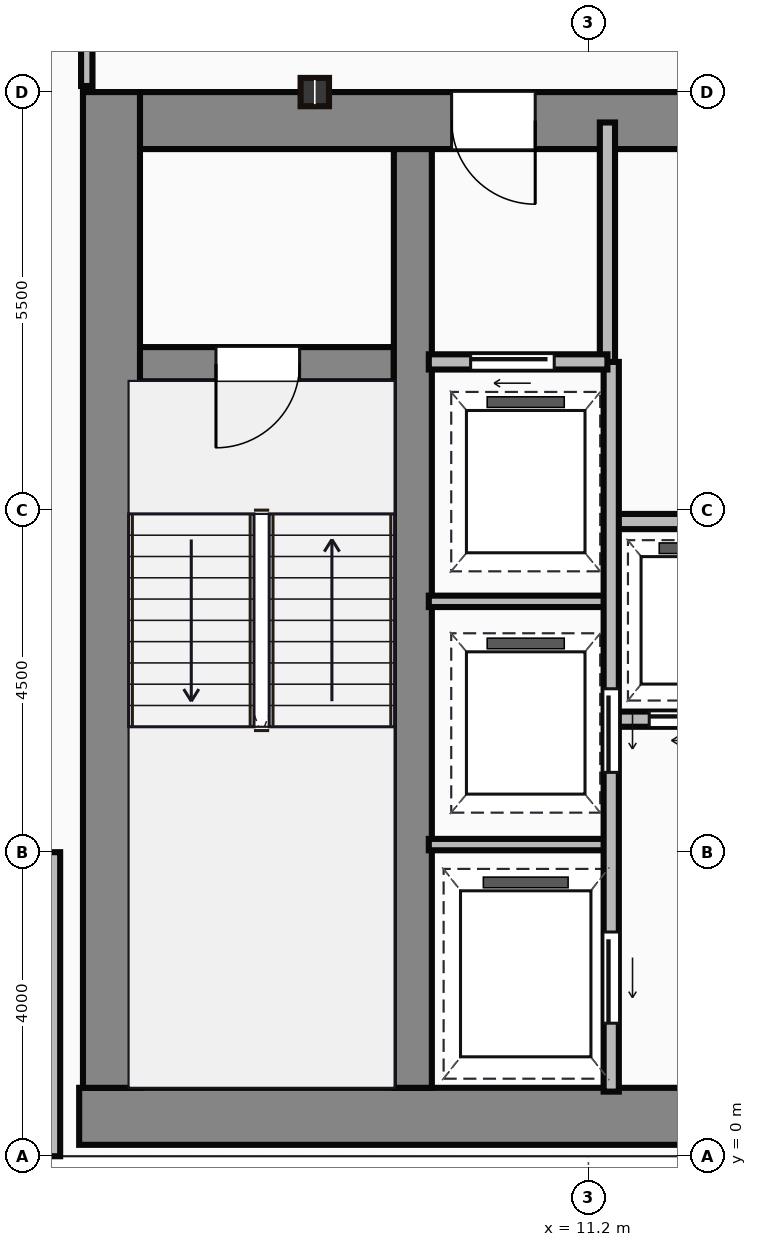
"""IFC4 building model, lengths in metres.
Left out: names, types, materials, properties, quantities, classifications, styles, units other than length and angle.
Written with IfcOpenShell. Run it as: python <this file> out.ifc"""

import sys

from ifc_helpers import new_model, si_unit, direction, frame, frame_2d, origin, origin_2d, place, context, subcontext, project, spatial, rectangle, i_section, extrude, source, transform, mapped, element, fill, save


model = new_model("IFC4")
c1 = context("Model", 3, precision=1e-05, world=origin(), true_north=direction((0.0, 1.0)))
c2 = subcontext(c1, "Body", "Model", "MODEL_VIEW")
j1 = project(units=[si_unit("LENGTHUNIT", "METRE"), si_unit("PLANEANGLEUNIT", "RADIAN")], contexts=[c1])
p1 = place(None, origin())
s1 = spatial("IfcSite", under=j1, at=p1, CompositionType="ELEMENT")
p2 = place(p1, origin())
s2 = spatial("IfcBuilding", under=s1, at=p2, CompositionType="ELEMENT")
p3 = place(p2, frame((0.0, 0.0, 151.55)))
s3 = spatial("IfcBuildingStorey", under=s2, at=p3, CompositionType="ELEMENT", Elevation=151.55)
m1 = source(origin(), c2, "Body", "SweptSolid", [
    extrude(rectangle(XDim=29.5, YDim=0.75, at=frame_2d((14.75, 0.0))), origin(), (0.0, 0.0, 1.0), 3.65),
])
p4 = place(p3, frame((4.5, 0.525, 0.0), z_axis=(0.0, 0.0, 1.0), x_axis=(1.0, 0.0, 0.0)))
e1 = element("IfcWall", 1, at=p4, inside=s3, PredefinedType="SHEAR", context=c2, shape_type="MappedRepresentation", body=[
    mapped(m1, transform((0.0, 0.0, 0.0))),
])
m2 = source(origin(), c2, "Body", "SweptSolid", [
    extrude(rectangle(XDim=13.1, YDim=0.75, at=frame_2d((6.55, 0.0))), origin(), (0.0, 0.0, 1.0), 3.65),
])
p5 = place(p3, frame((4.925, 0.9, 0.0), z_axis=(0.0, 0.0, 1.0), x_axis=(0.0, 1.0, 0.0)))
e2 = element("IfcWall", 2, at=p5, inside=s3, PredefinedType="SHEAR", context=c2, shape_type="MappedRepresentation", body=[
    mapped(m2, transform((0.0, 0.0, 0.0))),
])
m3 = source(origin(), c2, "Body", "SweptSolid", [
    extrude(rectangle(XDim=9.1, YDim=0.75, at=frame_2d((4.55, 0.0))), origin(), (0.0, 0.0, 1.0), 3.65),
])
p6 = place(p3, frame((5.3, 13.625, 0.0), z_axis=(0.0, 0.0, 1.0), x_axis=(1.0, 0.0, 0.0)))
e3 = element("IfcWall", 3, at=p6, inside=s3, PredefinedType="SHEAR", context=c2, shape_type="MappedRepresentation", body=[
    mapped(m3, transform((0.0, 0.0, 0.0))),
])
p7 = place(p6, frame((4.1, 0.0, 0.0)))
e4 = element("IfcOpeningElement", 4, at=p7, cuts=e3, PredefinedType="OPENING", context=c2, shape_type="SweptSolid", body=[
    extrude(rectangle(XDim=1.1, YDim=2.15, at=frame_2d((0.55, 1.075))), frame((0.0, 0.385, 0.0), z_axis=(0.0, -1.0, 0.0), x_axis=(1.0, 0.0, 0.0)), (0.0, 0.0, 1.0), 0.77),
])
m4 = source(origin(), c2, "Body", "SweptSolid", [
    extrude(rectangle(XDim=12.35, YDim=0.5, at=frame_2d((6.175, 0.0))), origin(), (0.0, 0.0, 1.0), 3.65),
])
p8 = place(p3, frame((8.89, 0.9, 0.0), z_axis=(0.0, 0.0, 1.0), x_axis=(0.0, 1.0, 0.0)))
e5 = element("IfcWall", 5, at=p8, inside=s3, PredefinedType="SHEAR", context=c2, shape_type="MappedRepresentation", body=[
    mapped(m4, transform((0.0, 0.0, 0.0))),
])
m5 = source(origin(), c2, "Body", "SweptSolid", [
    extrude(rectangle(XDim=3.39, YDim=0.45, at=frame_2d((1.695, 0.0))), origin(), (0.0, 0.0, 1.0), 3.65),
])
p9 = place(p3, frame((5.25, 10.42, 0.0), z_axis=(0.0, 0.0, 1.0), x_axis=(1.0, 0.0, 0.0)))
e6 = element("IfcWall", 6, at=p9, inside=s3, PredefinedType="SHEAR", context=c2, shape_type="MappedRepresentation", body=[
    mapped(m5, transform((0.0, 0.0, 0.0))),
])
p10 = place(p9, frame((1.05, 0.0, 0.0)))
e7 = element("IfcOpeningElement", 7, at=p10, cuts=e6, PredefinedType="OPENING", context=c2, shape_type="SweptSolid", body=[
    extrude(rectangle(XDim=1.1, YDim=2.15, at=frame_2d((0.55, 1.075))), frame((0.0, 0.235, 0.0), z_axis=(0.0, -1.0, 0.0), x_axis=(1.0, 0.0, 0.0)), (0.0, 0.0, 1.0), 0.47),
])
m6 = source(origin(), c2, "Body", "SweptSolid", [
    extrude(i_section(OverallWidth=0.374, OverallDepth=0.372, WebThickness=0.016, FlangeThickness=0.026, at=origin_2d()), origin(), (0.0, 0.0, 1.0), 3.65),
])
p11 = place(p3, frame((7.6, 14.0, 0.0), z_axis=(0.0, 0.0, 1.0), x_axis=(1.0, 0.0, 0.0)))
e8 = element("IfcColumn", 8, at=p11, inside=s3, PredefinedType="COLUMN", context=c2, shape_type="MappedRepresentation", body=[
    mapped(m6, transform((0.0, 0.0, 0.0))),
])
m7 = source(origin(), c2, "Body", "SweptSolid", [
    extrude(rectangle(XDim=4.0, YDim=0.25, at=frame_2d((2.0, 0.0))), origin(), (0.0, 0.0, 1.0), 3.4),
])
p12 = place(p3, frame((4.125, 4.0, 0.0), z_axis=(0.0, 0.0, 1.0), x_axis=(0.0, -1.0, 0.0)))
e9 = element("IfcWall", 9, at=p12, inside=s3, PredefinedType="STANDARD", context=c2, shape_type="MappedRepresentation", body=[
    mapped(m7, transform((0.0, 0.0, 0.0))),
])
m8 = source(origin(), c2, "Body", "SweptSolid", [
    extrude(rectangle(XDim=3.18, YDim=0.2, at=frame_2d((1.59, 0.0))), origin(), (0.0, 0.0, 1.0), 3.4),
])
p13 = place(p3, frame((11.45, 10.42, 0.0), z_axis=(0.0, 0.0, 1.0), x_axis=(0.0, 1.0, 0.0)))
e10 = element("IfcWall", 10, at=p13, inside=s3, PredefinedType="PARTITIONING", context=c2, shape_type="MappedRepresentation", body=[
    mapped(m8, transform((0.0, 0.0, 0.0))),
])
m9 = source(origin(), c2, "Body", "SweptSolid", [
    extrude(rectangle(XDim=2.35, YDim=0.2, at=frame_2d((1.175, 0.0))), origin(), (0.0, 0.0, 1.0), 3.4),
])
p14 = place(p3, frame((9.1, 10.45, 0.0), z_axis=(0.0, 0.0, 1.0), x_axis=(1.0, 0.0, 0.0)))
e11 = element("IfcWall", 11, at=p14, inside=s3, PredefinedType="PARTITIONING", context=c2, shape_type="MappedRepresentation", body=[
    mapped(m9, transform((0.0, 0.0, 0.0))),
])
p15 = place(p14, frame((0.55, 0.0, 0.0)))
e12 = element("IfcOpeningElement", 12, at=p15, cuts=e11, PredefinedType="OPENING", context=c2, shape_type="SweptSolid", body=[
    extrude(rectangle(XDim=1.1, YDim=2.15, at=frame_2d((0.55, 1.075))), frame((0.0, 0.11, 0.0), z_axis=(0.0, -1.0, 0.0), x_axis=(1.0, 0.0, 0.0)), (0.0, 0.0, 1.0), 0.22),
])
m10 = source(origin(), c2, "Body", "SweptSolid", [
    extrude(rectangle(XDim=9.6, YDim=0.2, at=frame_2d((4.8, 0.0))), origin(), (0.0, 0.0, 1.0), 3.4),
])
p16 = place(p3, frame((11.5, 0.85, 0.0), z_axis=(0.0, 0.0, 1.0), x_axis=(0.0, 1.0, 0.0)))
e13 = element("IfcWall", 13, at=p16, inside=s3, PredefinedType="PARTITIONING", context=c2, shape_type="MappedRepresentation", body=[
    mapped(m10, transform((0.0, 0.0, 0.0))),
])
p17 = place(p16, frame((4.2, 0.0, 0.0)))
e14 = element("IfcOpeningElement", 14, at=p17, cuts=e13, PredefinedType="OPENING", context=c2, shape_type="SweptSolid", body=[
    extrude(rectangle(XDim=1.1, YDim=2.15, at=frame_2d((0.55, 1.075))), frame((0.0, 0.11, 0.0), z_axis=(0.0, -1.0, 0.0), x_axis=(1.0, 0.0, 0.0)), (0.0, 0.0, 1.0), 0.22),
])
p18 = place(p16, frame((0.9, 0.0, 0.0)))
e15 = element("IfcOpeningElement", 15, at=p18, cuts=e13, PredefinedType="OPENING", context=c2, shape_type="SweptSolid", body=[
    extrude(rectangle(XDim=1.2, YDim=2.15, at=frame_2d((0.6, 1.075))), frame((0.0, 0.11, 0.0), z_axis=(0.0, -1.0, 0.0), x_axis=(1.0, 0.0, 0.0)), (0.0, 0.0, 1.0), 0.22),
])
m11 = source(origin(), c2, "Body", "SweptSolid", [
    extrude(rectangle(XDim=2.4, YDim=0.15, at=frame_2d((1.2, 0.0))), origin(), (0.0, 0.0, 1.0), 3.4),
])
for number, where, z_axis, x_axis in (
    (16, (9.1, 4.1, 0.0), (0.0, 0.0, 1.0), (1.0, 0.0, 0.0)),
    (17, (9.1, 7.3, 0.0), (0.0, 0.0, 1.0), (1.0, 0.0, 0.0)),
):
    element("IfcWall", number, at=place(p3, frame(where, z_axis=z_axis, x_axis=x_axis)), inside=s3, PredefinedType="PARTITIONING", context=c2, shape_type="MappedRepresentation", body=[
        mapped(m11, transform((0.0, 0.0, 0.0))),
    ])
m12 = source(origin(), c2, "Body", "SweptSolid", [
    extrude(rectangle(XDim=11.85, YDim=0.2, at=frame_2d((5.925, 0.0))), origin(), (0.0, 0.0, 1.0), 3.4),
])
p19 = place(p3, frame((11.55, 5.75, 0.0), z_axis=(0.0, 0.0, 1.0), x_axis=(1.0, 0.0, 0.0)))
e18 = element("IfcWall", 18, at=p19, inside=s3, PredefinedType="PARTITIONING", context=c2, shape_type="MappedRepresentation", body=[
    mapped(m12, transform((0.0, 0.0, 0.0))),
])
p20 = place(p19, frame((0.45, 0.0, 0.0)))
e19 = element("IfcOpeningElement", 19, at=p20, cuts=e18, PredefinedType="OPENING", context=c2, shape_type="SweptSolid", body=[
    extrude(rectangle(XDim=1.05, YDim=2.15, at=frame_2d((0.525, 1.075))), frame((0.0, 0.11, 0.0), z_axis=(0.0, -1.0, 0.0), x_axis=(1.0, 0.0, 0.0)), (0.0, 0.0, 1.0), 0.22),
])
p21 = place(p19, frame((2.4, 0.0, 0.0)))
e20 = element("IfcOpeningElement", 20, at=p21, cuts=e18, PredefinedType="OPENING", context=c2, shape_type="SweptSolid", body=[
    extrude(rectangle(XDim=1.05, YDim=2.15, at=frame_2d((0.525, 1.075))), frame((0.0, 0.11, 0.0), z_axis=(0.0, -1.0, 0.0), x_axis=(1.0, 0.0, 0.0)), (0.0, 0.0, 1.0), 0.22),
])
p22 = place(p19, frame((4.35, 0.0, 0.0)))
e21 = element("IfcOpeningElement", 21, at=p22, cuts=e18, PredefinedType="OPENING", context=c2, shape_type="SweptSolid", body=[
    extrude(rectangle(XDim=1.05, YDim=2.15, at=frame_2d((0.525, 1.075))), frame((0.0, 0.11, 0.0), z_axis=(0.0, -1.0, 0.0), x_axis=(1.0, 0.0, 0.0)), (0.0, 0.0, 1.0), 0.22),
])
p23 = place(p19, frame((6.3, 0.0, 0.0)))
e22 = element("IfcOpeningElement", 22, at=p23, cuts=e18, PredefinedType="OPENING", context=c2, shape_type="SweptSolid", body=[
    extrude(rectangle(XDim=1.05, YDim=2.15, at=frame_2d((0.525, 1.075))), frame((0.0, 0.11, 0.0), z_axis=(0.0, -1.0, 0.0), x_axis=(1.0, 0.0, 0.0)), (0.0, 0.0, 1.0), 0.22),
])
p24 = place(p19, frame((8.25, 0.0, 0.0)))
e23 = element("IfcOpeningElement", 23, at=p24, cuts=e18, PredefinedType="OPENING", context=c2, shape_type="SweptSolid", body=[
    extrude(rectangle(XDim=1.05, YDim=2.15, at=frame_2d((0.525, 1.075))), frame((0.0, 0.11, 0.0), z_axis=(0.0, -1.0, 0.0), x_axis=(1.0, 0.0, 0.0)), (0.0, 0.0, 1.0), 0.22),
])
p25 = place(p19, frame((10.2, 0.0, 0.0)))
e24 = element("IfcOpeningElement", 24, at=p25, cuts=e18, PredefinedType="OPENING", context=c2, shape_type="SweptSolid", body=[
    extrude(rectangle(XDim=1.05, YDim=2.15, at=frame_2d((0.525, 1.075))), frame((0.0, 0.11, 0.0), z_axis=(0.0, -1.0, 0.0), x_axis=(1.0, 0.0, 0.0)), (0.0, 0.0, 1.0), 0.22),
])
p26 = place(p3, frame((11.55, 8.35, 0.0), z_axis=(0.0, 0.0, 1.0), x_axis=(1.0, 0.0, 0.0)))
e25 = element("IfcWall", 25, at=p26, inside=s3, PredefinedType="PARTITIONING", context=c2, shape_type="MappedRepresentation", body=[
    mapped(m12, transform((0.0, 0.0, 0.0))),
])
m13 = source(origin(), c2, "Body", "SweptSolid", [
    extrude(rectangle(XDim=2.22, YDim=0.15, at=frame_2d((1.11, 0.0))), origin(), (0.0, 0.0, 1.0), 3.4),
])
p27 = place(p3, frame((4.6, 14.08, 0.0), z_axis=(0.0, 0.0, 1.0), x_axis=(0.0, 1.0, 0.0)))
e26 = element("IfcWall", 26, at=p27, inside=s3, PredefinedType="PARTITIONING", context=c2, shape_type="MappedRepresentation", body=[
    mapped(m13, transform((0.0, 0.0, 0.0))),
])
m14 = source(origin(), c2, "Body", "SweptSolid", [
    extrude(rectangle(XDim=1.1, YDim=2.15, at=frame_2d((0.55, 1.075))), frame((0.0, 0.025, 0.0), z_axis=(0.0, -1.0, 0.0), x_axis=(1.0, 0.0, 0.0)), (0.0, 0.0, 1.0), 0.05),
])
p28 = place(p10, frame((1.1, 0.0, 0.0), z_axis=(0.0, 0.0, 1.0), x_axis=(-1.0, 0.0, 0.0)))
e27 = element("IfcDoor", 27, at=p28, inside=s3, OperationType="SINGLE_SWING_LEFT", PredefinedType="DOOR", context=c2, shape_type="MappedRepresentation", body=[
    mapped(m14, transform((0.0, 0.0, 0.0))),
])
fill(e7, e27)
p29 = place(p7, origin())
e28 = element("IfcDoor", 28, at=p29, inside=s3, OperationType="SINGLE_SWING_RIGHT", PredefinedType="DOOR", context=c2, shape_type="MappedRepresentation", body=[
    mapped(m14, transform((0.0, 0.0, 0.0))),
])
fill(e4, e28)
p30 = place(p15, origin())
e29 = element("IfcDoor", 29, at=p30, inside=s3, OperationType="SLIDING_TO_LEFT", PredefinedType="DOOR", context=c2, shape_type="MappedRepresentation", body=[
    mapped(m14, transform((0.0, 0.0, 0.0))),
])
fill(e12, e29)
p31 = place(p17, frame((1.1, 0.0, 0.0), z_axis=(0.0, 0.0, 1.0), x_axis=(-1.0, 0.0, 0.0)))
e30 = element("IfcDoor", 30, at=p31, inside=s3, OperationType="SLIDING_TO_LEFT", PredefinedType="DOOR", context=c2, shape_type="MappedRepresentation", body=[
    mapped(m14, transform((0.0, 0.0, 0.0))),
])
fill(e14, e30)
m15 = source(origin(), c2, "Body", "SweptSolid", [
    extrude(rectangle(XDim=1.2, YDim=2.15, at=frame_2d((0.6, 1.075))), frame((0.0, 0.025, 0.0), z_axis=(0.0, -1.0, 0.0), x_axis=(1.0, 0.0, 0.0)), (0.0, 0.0, 1.0), 0.05),
])
p32 = place(p18, frame((1.2, 0.0, 0.0), z_axis=(0.0, 0.0, 1.0), x_axis=(-1.0, 0.0, 0.0)))
e31 = element("IfcDoor", 31, at=p32, inside=s3, OperationType="SLIDING_TO_LEFT", PredefinedType="DOOR", context=c2, shape_type="MappedRepresentation", body=[
    mapped(m15, transform((0.0, 0.0, 0.0))),
])
fill(e15, e31)
m16 = source(origin(), c2, "Body", "SweptSolid", [
    extrude(rectangle(XDim=1.05, YDim=2.15, at=frame_2d((0.525, 1.075))), frame((0.0, 0.025, 0.0), z_axis=(0.0, -1.0, 0.0), x_axis=(1.0, 0.0, 0.0)), (0.0, 0.0, 1.0), 0.05),
])
p33 = place(p20, frame((1.05, 0.0, 0.0), z_axis=(0.0, 0.0, 1.0), x_axis=(-1.0, 0.0, 0.0)))
e32 = element("IfcDoor", 32, at=p33, inside=s3, OperationType="SLIDING_TO_LEFT", PredefinedType="DOOR", context=c2, shape_type="MappedRepresentation", body=[
    mapped(m16, transform((0.0, 0.0, 0.0))),
])
fill(e19, e32)
save(model, sys.argv[1])
